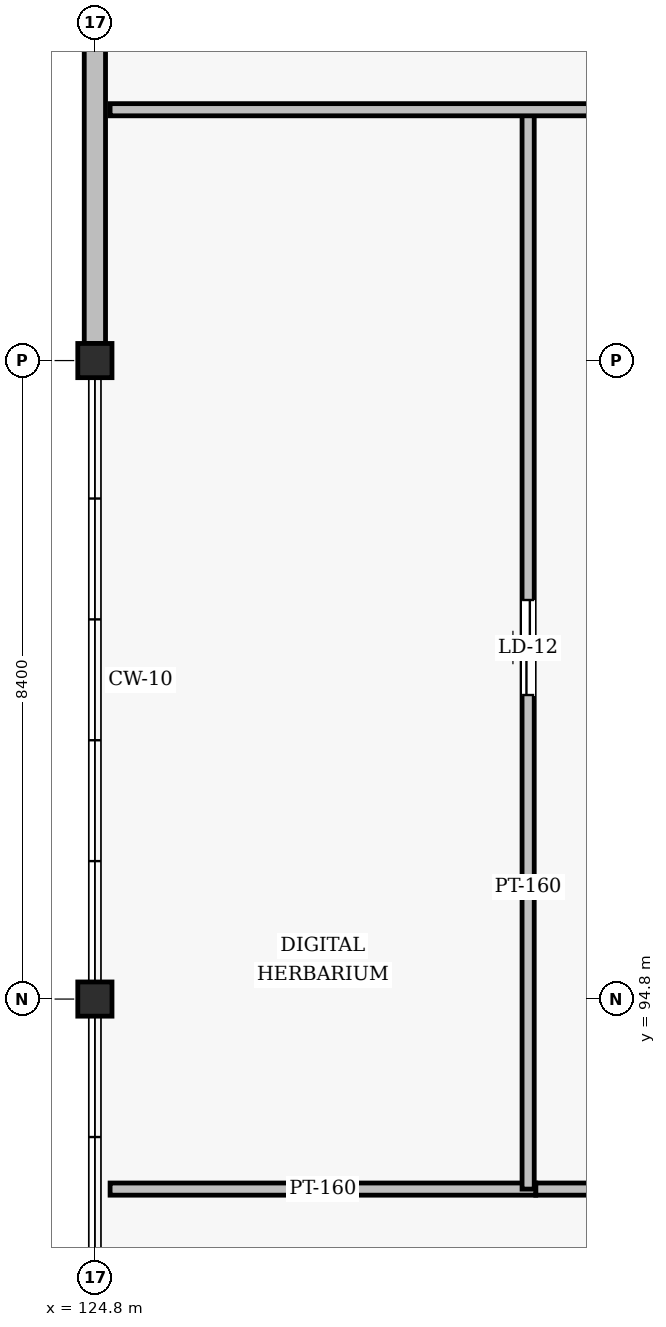
"""IFC4 building model, lengths in metres.
Left out: names, types, materials, properties, quantities, classifications, styles, units other than length and angle.
Written with IfcOpenShell. Run it as: python <this file> out.ifc"""

import sys

from ifc_helpers import new_model, si_unit, direction, frame, frame_2d, origin, origin_2d, place, context, subcontext, project, spatial, rectangle, hollow_rectangle, extrude, element, fill, save


model = new_model("IFC4")
c1 = context("Model", 3, precision=1e-05, world=origin(), true_north=direction((0.0, 1.0)))
c2 = subcontext(c1, "Body", "Model", "MODEL_VIEW")
j1 = project(units=[si_unit("LENGTHUNIT", "METRE"), si_unit("PLANEANGLEUNIT", "RADIAN")], contexts=[c1])
p1 = place(None, origin())
s1 = spatial("IfcSite", under=j1, at=p1, CompositionType="ELEMENT")
p2 = place(p1, origin())
s2 = spatial("IfcBuilding", under=s1, at=p2, CompositionType="ELEMENT")
p3 = place(p2, frame((0.0, 0.0, 46.8)))
s3 = spatial("IfcBuildingStorey", under=s2, at=p3, CompositionType="ELEMENT", Elevation=46.8)
for number, where, z_axis, x_axis in (
    (1, (124.8, 94.8, 0.0), (0.0, 0.0, 1.0), (1.0, 0.0, 0.0)),
    (2, (124.8, 103.2, 0.0), (0.0, 0.0, 1.0), (1.0, 0.0, 0.0)),
):
    element("IfcColumn", number, at=place(p3, frame(where, z_axis=z_axis, x_axis=x_axis)), inside=s3, PredefinedType="COLUMN", context=c2, shape_type="SweptSolid", body=[
        extrude(hollow_rectangle(XDim=0.45, YDim=0.45, WallThickness=0.018, InnerFilletRadius=0.018, OuterFilletRadius=0.036, at=origin_2d()), origin(), (0.0, 0.0, 1.0), 3.576),
    ])
p4 = place(p3, frame((124.8, 114.975, 0.0), z_axis=(0.0, 0.0, 1.0), x_axis=(0.0, -1.0, 0.0)))
e3 = element("IfcWall", 3, at=p4, inside=s3, PredefinedType="SOLIDWALL", context=c2, shape_type="SweptSolid", body=[
    extrude(rectangle(XDim=11.55, YDim=0.28, at=frame_2d((5.775, 0.0))), origin(), (0.0, 0.0, 1.0), 2.548),
])
p5 = place(p3, frame((130.6, 92.3, 0.0), z_axis=(0.0, 0.0, 1.0), x_axis=(1.0, 0.0, 0.0)))
e4 = element("IfcWall", 4, at=p5, inside=s3, PredefinedType="PARTITIONING", context=c2, shape_type="SweptSolid", body=[
    extrude(rectangle(XDim=13.5, YDim=0.16, at=frame_2d((6.75, 0.0))), origin(), (0.0, 0.0, 1.0), 2.838),
])
p6 = place(p5, frame((5.95, 0.0, 0.0)))
e5 = element("IfcOpeningElement", 5, at=p6, cuts=e4, PredefinedType="OPENING", context=c2, shape_type="SweptSolid", body=[
    extrude(rectangle(XDim=1.6, YDim=2.1, at=frame_2d((0.8, 1.05))), frame((0.0, 0.09, 0.0), z_axis=(0.0, -1.0, 0.0), x_axis=(1.0, 0.0, 0.0)), (0.0, 0.0, 1.0), 0.18),
])
p7 = place(p3, frame((125.0, 92.3, 0.0), z_axis=(0.0, 0.0, 1.0), x_axis=(1.0, 0.0, 0.0)))
e6 = element("IfcWall", 6, at=p7, inside=s3, PredefinedType="PARTITIONING", context=c2, shape_type="SweptSolid", body=[
    extrude(rectangle(XDim=5.6, YDim=0.16, at=frame_2d((2.8, 0.0))), origin(), (0.0, 0.0, 1.0), 3.338),
])
p8 = place(p3, frame((130.5, 92.3, 0.0), z_axis=(0.0, 0.0, 1.0), x_axis=(0.0, 1.0, 0.0)))
e7 = element("IfcWall", 7, at=p8, inside=s3, PredefinedType="PARTITIONING", context=c2, shape_type="SweptSolid", body=[
    extrude(rectangle(XDim=14.2, YDim=0.16, at=frame_2d((7.1, 0.0))), origin(), (0.0, 0.0, 1.0), 2.838),
])
p9 = place(p8, frame((6.5, 0.0, 0.0)))
e8 = element("IfcOpeningElement", 8, at=p9, cuts=e7, PredefinedType="OPENING", context=c2, shape_type="SweptSolid", body=[
    extrude(rectangle(XDim=1.25, YDim=2.12, at=frame_2d((0.625, 1.06))), frame((0.0, 0.09, 0.0), z_axis=(0.0, -1.0, 0.0), x_axis=(1.0, 0.0, 0.0)), (0.0, 0.0, 1.0), 0.18),
])
p10 = place(p3, frame((125.0, 106.5, 0.0), z_axis=(0.0, 0.0, 1.0), x_axis=(1.0, 0.0, 0.0)))
e9 = element("IfcWall", 9, at=p10, inside=s3, PredefinedType="PARTITIONING", context=c2, shape_type="SweptSolid", body=[
    extrude(rectangle(XDim=28.9, YDim=0.16, at=frame_2d((14.45, 0.0))), origin(), (0.0, 0.0, 1.0), 2.588),
])
p11 = place(p10, frame((13.85, 0.0, 0.0)))
e10 = element("IfcOpeningElement", 10, at=p11, cuts=e9, PredefinedType="OPENING", context=c2, shape_type="SweptSolid", body=[
    extrude(rectangle(XDim=1.2, YDim=2.08, at=frame_2d((0.6, 1.04))), frame((0.0, 0.09, 0.0), z_axis=(0.0, -1.0, 0.0), x_axis=(1.0, 0.0, 0.0)), (0.0, 0.0, 1.0), 0.18),
])
p12 = place(p9, origin())
e11 = element("IfcDoor", 11, at=p12, inside=s3, OperationType="SINGLE_SWING_LEFT", PredefinedType="DOOR", context=c2, shape_type="SweptSolid", body=[
    extrude(rectangle(XDim=1.25, YDim=2.12, at=frame_2d((0.625, 1.06))), frame((0.0, 0.025, 0.0), z_axis=(0.0, -1.0, 0.0), x_axis=(1.0, 0.0, 0.0)), (0.0, 0.0, 1.0), 0.05),
])
fill(e8, e11)
save(model, sys.argv[1])
